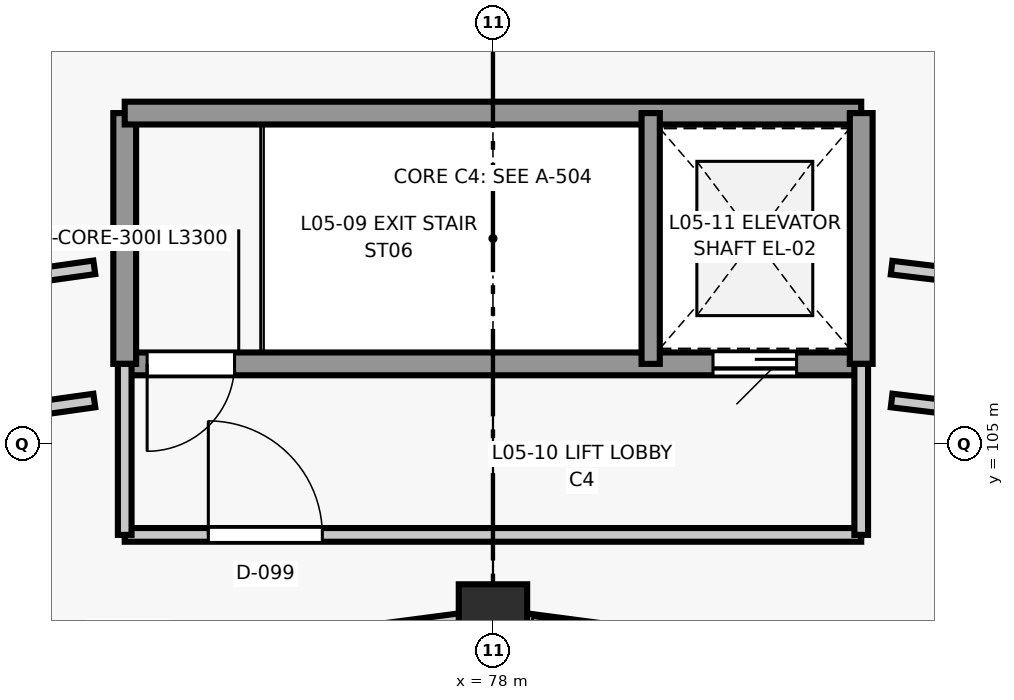
"""IFC4 building model, lengths in metres.
Left out: names, types, materials, properties, quantities, classifications, styles, units other than length and angle.
Written with IfcOpenShell. Run it as: python <this file> out.ifc"""

import sys

from ifc_helpers import new_model, si_unit, direction, frame, frame_2d, origin, origin_2d, place, context, subcontext, project, spatial, rectangle, circle, extrude, element, fill, save


model = new_model("IFC4")
c1 = context("Model", 3, precision=1e-05, world=origin(), true_north=direction((0.0, 1.0)))
c2 = subcontext(c1, "Body", "Model", "MODEL_VIEW")
j1 = project(units=[si_unit("LENGTHUNIT", "METRE"), si_unit("PLANEANGLEUNIT", "RADIAN")], contexts=[c1])
p1 = place(None, origin())
s1 = spatial("IfcSite", under=j1, at=p1, CompositionType="ELEMENT")
p2 = place(p1, origin())
s2 = spatial("IfcBuilding", under=s1, at=p2, CompositionType="ELEMENT")
p3 = place(p2, frame((0.0, 0.0, 20.4)))
s3 = spatial("IfcBuildingStorey", under=s2, at=p3, CompositionType="ELEMENT", Elevation=20.4)
p4 = place(p3, frame((78.0, 102.7, 0.0), z_axis=(0.0, 0.0, 1.0), x_axis=(1.0, 0.0, 0.0)))
e1 = element("IfcColumn", 1, at=p4, inside=s3, PredefinedType="COLUMN", context=c2, shape_type="SweptSolid", body=[
    extrude(circle(Radius=0.45, at=origin_2d()), origin(), (0.0, 0.0, 1.0), 3.9),
])
p5 = place(p3, frame((78.35, 111.554, 0.0), z_axis=(0.0, 0.0, 1.0), x_axis=(0.991443215359, -0.130538694334, 0.0)))
e2 = element("IfcWall", 2, at=p5, inside=s3, PredefinedType="STANDARD", context=c2, shape_type="SweptSolid", body=[
    extrude(rectangle(XDim=11.328, YDim=0.28, at=frame_2d((5.664, 0.0))), origin(), (0.0, 0.0, 1.0), 0.82),
])
p6 = place(p3, frame((87.353, 101.469, 0.0), z_axis=(0.0, 0.0, 1.0), x_axis=(-0.991441766434, 0.130549698469, 0.0)))
e3 = element("IfcWall", 3, at=p6, inside=s3, PredefinedType="STANDARD", context=c2, shape_type="SweptSolid", body=[
    extrude(rectangle(XDim=9.156, YDim=0.25, at=frame_2d((4.578, 0.0))), origin(), (0.0, 0.0, 1.0), 0.82),
])
p7 = place(p3, frame((66.419, 110.075, 0.0), z_axis=(0.0, 0.0, 1.0), x_axis=(0.991443215359, 0.130538694334, 0.0)))
e4 = element("IfcWall", 4, at=p7, inside=s3, PredefinedType="STANDARD", context=c2, shape_type="SweptSolid", body=[
    extrude(rectangle(XDim=11.328, YDim=0.28, at=frame_2d((5.664, 0.0))), origin(), (0.0, 0.0, 1.0), 0.82),
])
p8 = place(p3, frame((77.725, 102.664, 0.0), z_axis=(0.0, 0.0, 1.0), x_axis=(-0.991441766434, -0.130549698469, 0.0)))
e5 = element("IfcWall", 5, at=p8, inside=s3, PredefinedType="STANDARD", context=c2, shape_type="SweptSolid", body=[
    extrude(rectangle(XDim=9.156, YDim=0.25, at=frame_2d((4.578, 0.0))), origin(), (0.0, 0.0, 1.0), 2.969),
])
p9 = place(p8, frame((3.528, 0.0, 0.85)))
e6 = element("IfcOpeningElement", 6, at=p9, cuts=e5, PredefinedType="OPENING", context=c2, shape_type="SweptSolid", body=[
    extrude(rectangle(XDim=2.1, YDim=1.75, at=frame_2d((1.05, 0.875))), frame((0.0, 0.135, 0.0), z_axis=(0.0, -1.0, 0.0), x_axis=(1.0, 0.0, 0.0)), (0.0, 0.0, 1.0), 0.27),
])
p10 = place(p3, frame((82.845, 106.05, 0.0), z_axis=(0.0, 0.0, 1.0), x_axis=(-1.0, 0.0, 0.0)))
e7 = element("IfcWall", 7, at=p10, inside=s3, PredefinedType="SHEAR", context=c2, shape_type="SweptSolid", body=[
    extrude(rectangle(XDim=9.69, YDim=0.3, at=frame_2d((4.845, 0.0))), origin(), (0.0, 0.0, 1.0), 3.9),
])
p11 = place(p10, frame((8.245, 0.0, 0.0)))
e8 = element("IfcOpeningElement", 8, at=p11, cuts=e7, PredefinedType="OPENING", context=c2, shape_type="SweptSolid", body=[
    extrude(rectangle(XDim=1.15, YDim=2.15, at=frame_2d((0.575, 1.075))), frame((0.0, 0.16, 0.0), z_axis=(0.0, -1.0, 0.0), x_axis=(1.0, 0.0, 0.0)), (0.0, 0.0, 1.0), 0.32),
])
p12 = place(p10, frame((0.85, 0.0, 0.0)))
e9 = element("IfcOpeningElement", 9, at=p12, cuts=e7, PredefinedType="OPENING", context=c2, shape_type="SweptSolid", body=[
    extrude(rectangle(XDim=1.1, YDim=2.15, at=frame_2d((0.55, 1.075))), frame((0.0, 0.16, 0.0), z_axis=(0.0, -1.0, 0.0), x_axis=(1.0, 0.0, 0.0)), (0.0, 0.0, 1.0), 0.32),
])
p13 = place(p3, frame((73.155, 106.05, 0.0), z_axis=(0.0, 0.0, 1.0), x_axis=(0.0, 1.0, 0.0)))
e10 = element("IfcWall", 10, at=p13, inside=s3, PredefinedType="SHEAR", context=c2, shape_type="SweptSolid", body=[
    extrude(rectangle(XDim=3.3, YDim=0.3, at=frame_2d((1.65, 0.0))), origin(), (0.0, 0.0, 1.0), 3.9),
])
p14 = place(p3, frame((73.155, 109.35, 0.0), z_axis=(0.0, 0.0, 1.0), x_axis=(1.0, 0.0, 0.0)))
e11 = element("IfcWall", 11, at=p14, inside=s3, PredefinedType="SHEAR", context=c2, shape_type="SweptSolid", body=[
    extrude(rectangle(XDim=9.69, YDim=0.3, at=frame_2d((4.845, 0.0))), origin(), (0.0, 0.0, 1.0), 3.9),
])
p15 = place(p3, frame((82.845, 109.35, 0.0), z_axis=(0.0, 0.0, 1.0), x_axis=(0.0, -1.0, 0.0)))
e12 = element("IfcWall", 12, at=p15, inside=s3, PredefinedType="SHEAR", context=c2, shape_type="SweptSolid", body=[
    extrude(rectangle(XDim=3.3, YDim=0.3, at=frame_2d((1.65, 0.0))), origin(), (0.0, 0.0, 1.0), 3.9),
])
p16 = place(p3, frame((80.075, 106.05, 0.0), z_axis=(0.0, 0.0, 1.0), x_axis=(0.0, 1.0, 0.0)))
e13 = element("IfcWall", 13, at=p16, inside=s3, PredefinedType="SHEAR", context=c2, shape_type="SweptSolid", body=[
    extrude(rectangle(XDim=3.3, YDim=0.24, at=frame_2d((1.65, 0.0))), origin(), (0.0, 0.0, 1.0), 3.9),
])
p17 = place(p3, frame((73.155, 103.8, 0.0), z_axis=(0.0, 0.0, 1.0), x_axis=(1.0, 0.0, 0.0)))
e14 = element("IfcWall", 14, at=p17, inside=s3, PredefinedType="PARTITIONING", context=c2, shape_type="SweptSolid", body=[
    extrude(rectangle(XDim=9.69, YDim=0.18, at=frame_2d((4.845, 0.0))), origin(), (0.0, 0.0, 1.0), 3.675),
])
p18 = place(p17, frame((1.1, 0.0, 0.0)))
e15 = element("IfcOpeningElement", 15, at=p18, cuts=e14, PredefinedType="OPENING", context=c2, shape_type="SweptSolid", body=[
    extrude(rectangle(XDim=1.5, YDim=2.15, at=frame_2d((0.75, 1.075))), frame((0.0, 0.1, 0.0), z_axis=(0.0, -1.0, 0.0), x_axis=(1.0, 0.0, 0.0)), (0.0, 0.0, 1.0), 0.2),
])
for number, where, z_axis, x_axis in (
    (16, (73.155, 106.05, 0.0), (0.0, 0.0, 1.0), (0.0, -1.0, 0.0)),
    (17, (82.845, 106.05, 0.0), (0.0, 0.0, 1.0), (0.0, -1.0, 0.0)),
):
    element("IfcWall", number, at=place(p3, frame(where, z_axis=z_axis, x_axis=x_axis)), inside=s3, PredefinedType="PARTITIONING", context=c2, shape_type="SweptSolid", body=[
        extrude(rectangle(XDim=2.25, YDim=0.18, at=frame_2d((1.125, 0.0))), origin(), (0.0, 0.0, 1.0), 3.675),
    ])
p19 = place(p3, frame((88.487, 106.686, 0.0), z_axis=(0.0, 0.0, 1.0), x_axis=(-0.992847489582, 0.119389540709, 0.0)))
e18 = element("IfcWall", 18, at=p19, inside=s3, PredefinedType="PARTITIONING", context=c2, shape_type="SweptSolid", body=[
    extrude(rectangle(XDim=5.28, YDim=0.18, at=frame_2d((2.64, 0.0))), origin(), (0.0, 0.0, 1.0), 3.675),
])
p20 = place(p19, frame((1.915, 0.0, 0.0)))
e19 = element("IfcOpeningElement", 19, at=p20, cuts=e18, PredefinedType="OPENING", context=c2, shape_type="SweptSolid", body=[
    extrude(rectangle(XDim=1.45, YDim=2.2, at=frame_2d((0.725, 1.1))), frame((0.0, 0.1, 0.0), z_axis=(0.0, -1.0, 0.0), x_axis=(1.0, 0.0, 0.0)), (0.0, 0.0, 1.0), 0.2),
])
p21 = place(p3, frame((88.055, 104.99, 0.0), z_axis=(0.0, 0.0, 1.0), x_axis=(-0.992849152451, 0.119375711422, 0.0)))
e20 = element("IfcWall", 20, at=p21, inside=s3, PredefinedType="PARTITIONING", context=c2, shape_type="SweptSolid", body=[
    extrude(rectangle(XDim=4.845, YDim=0.18, at=frame_2d((2.422, 0.0))), origin(), (0.0, 0.0, 1.0), 3.675),
])
p22 = place(p21, frame((1.948, 0.0, 0.0)))
e21 = element("IfcOpeningElement", 21, at=p22, cuts=e20, PredefinedType="OPENING", context=c2, shape_type="SweptSolid", body=[
    extrude(rectangle(XDim=0.95, YDim=2.1, at=frame_2d((0.475, 1.05))), frame((0.0, 0.1, 0.0), z_axis=(0.0, -1.0, 0.0), x_axis=(1.0, 0.0, 0.0)), (0.0, 0.0, 1.0), 0.2),
])
p23 = place(p3, frame((72.755, 107.32, 0.0), z_axis=(0.0, 0.0, 1.0), x_axis=(-0.990269980721, -0.139159495841, 0.0)))
e22 = element("IfcWall", 22, at=p23, inside=s3, PredefinedType="PARTITIONING", context=c2, shape_type="SweptSolid", body=[
    extrude(rectangle(XDim=6.121, YDim=0.18, at=frame_2d((3.061, 0.0))), origin(), (0.0, 0.0, 1.0), 3.675),
])
p24 = place(p23, frame((2.536, 0.0, 0.0)))
e23 = element("IfcOpeningElement", 23, at=p24, cuts=e22, PredefinedType="OPENING", context=c2, shape_type="SweptSolid", body=[
    extrude(rectangle(XDim=1.05, YDim=2.1, at=frame_2d((0.525, 1.05))), frame((0.0, 0.1, 0.0), z_axis=(0.0, -1.0, 0.0), x_axis=(1.0, 0.0, 0.0)), (0.0, 0.0, 1.0), 0.2),
])
p25 = place(p3, frame((72.755, 105.568, 0.0), z_axis=(0.0, 0.0, 1.0), x_axis=(-0.990264117546, -0.139201212283, 0.0)))
e24 = element("IfcWall", 24, at=p25, inside=s3, PredefinedType="PARTITIONING", context=c2, shape_type="SweptSolid", body=[
    extrude(rectangle(XDim=5.651, YDim=0.18, at=frame_2d((2.825, 0.0))), origin(), (0.0, 0.0, 1.0), 3.675),
])
p26 = place(p25, frame((2.226, 0.0, 0.0)))
e25 = element("IfcOpeningElement", 25, at=p26, cuts=e24, PredefinedType="OPENING", context=c2, shape_type="SweptSolid", body=[
    extrude(rectangle(XDim=1.2, YDim=2.15, at=frame_2d((0.6, 1.075))), frame((0.0, 0.1, 0.0), z_axis=(0.0, -1.0, 0.0), x_axis=(1.0, 0.0, 0.0)), (0.0, 0.0, 1.0), 0.2),
])
p27 = place(p11, origin())
e26 = element("IfcDoor", 26, at=p27, inside=s3, OperationType="SINGLE_SWING_RIGHT", PredefinedType="DOOR", context=c2, shape_type="SweptSolid", body=[
    extrude(rectangle(XDim=1.15, YDim=2.15, at=frame_2d((0.575, 1.075))), frame((0.0, 0.025, 0.0), z_axis=(0.0, -1.0, 0.0), x_axis=(1.0, 0.0, 0.0)), (0.0, 0.0, 1.0), 0.05),
])
fill(e8, e26)
p28 = place(p12, origin())
e27 = element("IfcDoor", 27, at=p28, inside=s3, OperationType="SLIDING_TO_LEFT", PredefinedType="DOOR", context=c2, shape_type="SweptSolid", body=[
    extrude(rectangle(XDim=1.1, YDim=2.15, at=frame_2d((0.55, 1.075))), frame((0.0, 0.025, 0.0), z_axis=(0.0, -1.0, 0.0), x_axis=(1.0, 0.0, 0.0)), (0.0, 0.0, 1.0), 0.05),
])
fill(e9, e27)
p29 = place(p18, origin())
e28 = element("IfcDoor", 28, at=p29, inside=s3, OperationType="SINGLE_SWING_LEFT", PredefinedType="DOOR", context=c2, shape_type="SweptSolid", body=[
    extrude(rectangle(XDim=1.5, YDim=2.15, at=frame_2d((0.75, 1.075))), frame((0.0, 0.025, 0.0), z_axis=(0.0, -1.0, 0.0), x_axis=(1.0, 0.0, 0.0)), (0.0, 0.0, 1.0), 0.05),
])
fill(e15, e28)
save(model, sys.argv[1])
